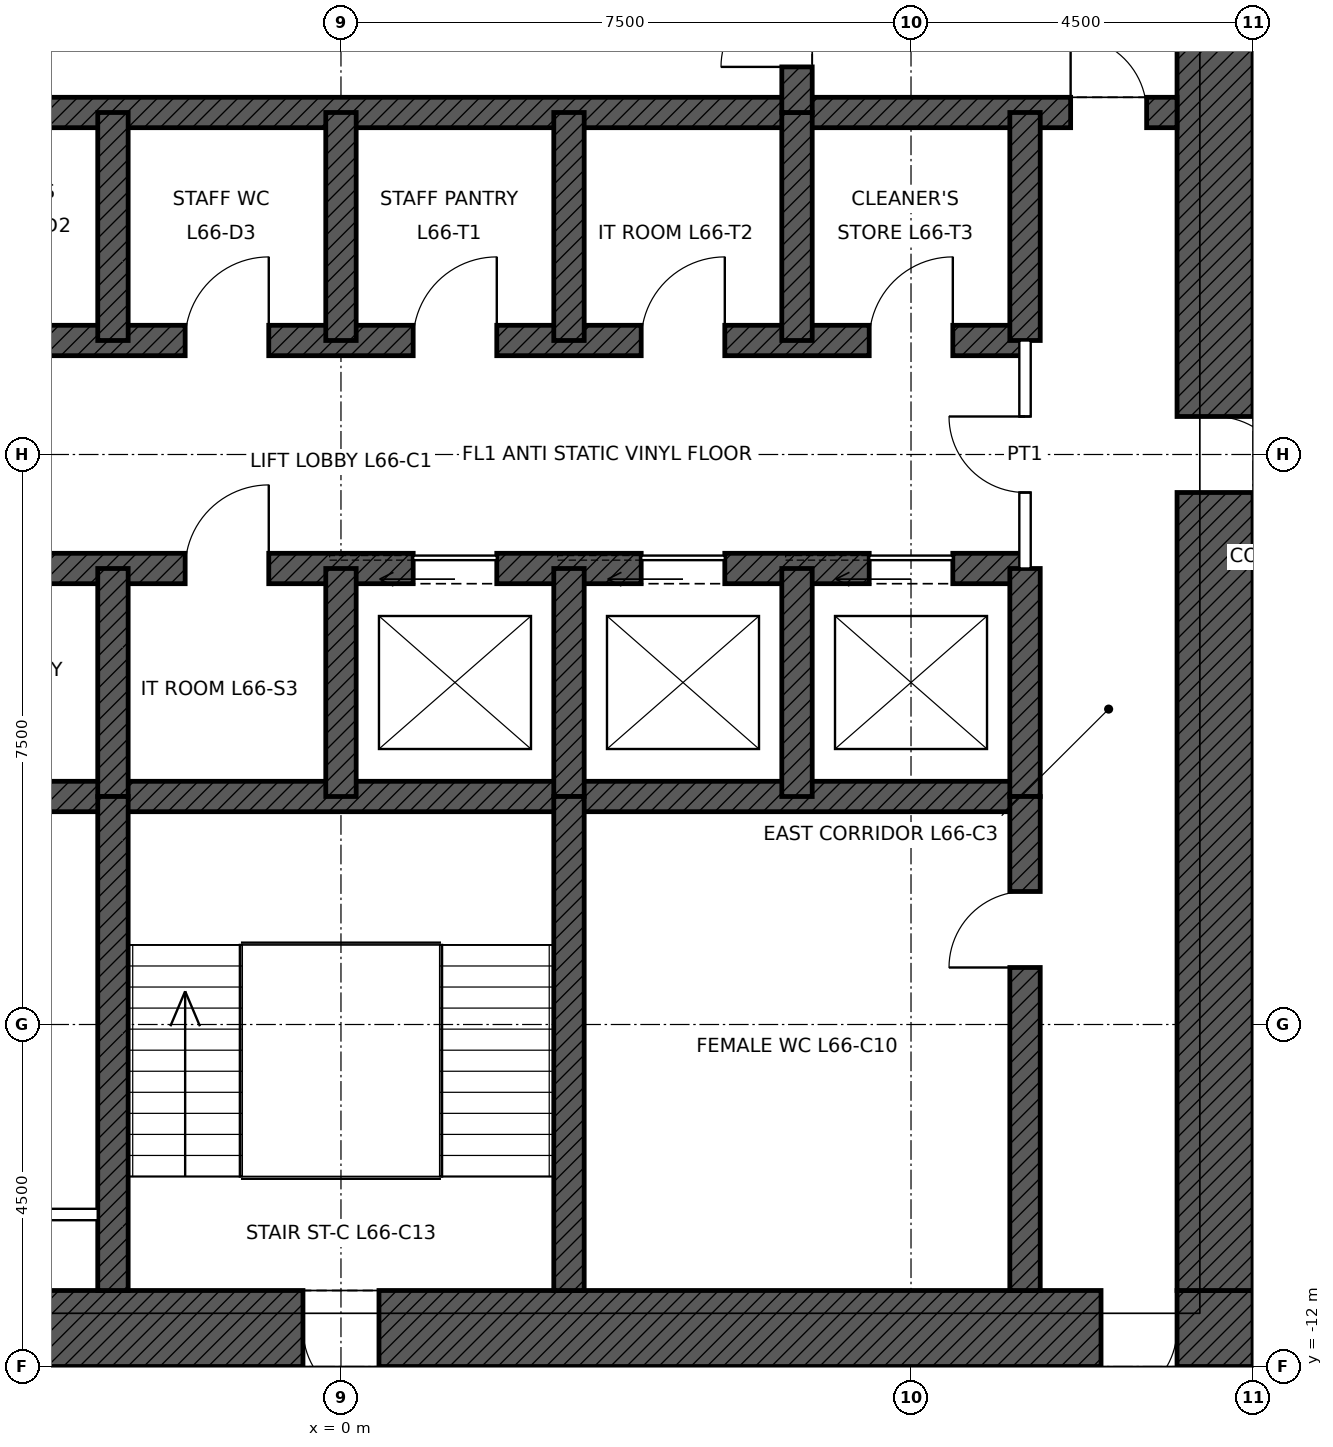
"""IFC4 building model, lengths in metres.
Left out: names, types, materials, properties, quantities, classifications, styles, units other than length and angle.
Written with IfcOpenShell. Run it as: python <this file> out.ifc"""

import sys

from ifc_helpers import new_model, si_unit, direction, frame, frame_2d, origin, place, context, subcontext, project, spatial, rectangle, extrude, element, fill, save


model = new_model("IFC4")
c1 = context("Model", 3, precision=1e-05, world=origin(), true_north=direction((0.0, 1.0)))
c2 = subcontext(c1, "Body", "Model", "MODEL_VIEW")
j1 = project(units=[si_unit("LENGTHUNIT", "METRE"), si_unit("PLANEANGLEUNIT", "RADIAN")], contexts=[c1])
p1 = place(None, origin())
s1 = spatial("IfcSite", under=j1, at=p1, CompositionType="ELEMENT")
p2 = place(p1, origin())
s2 = spatial("IfcBuilding", under=s1, at=p2, CompositionType="ELEMENT")
p3 = place(p2, frame((0.0, 0.0, 299.9)))
s3 = spatial("IfcBuildingStorey", under=s2, at=p3, CompositionType="ELEMENT", Elevation=299.9)
p4 = place(p3, frame((12.0, -11.5, 0.0), z_axis=(0.0, 0.0, 1.0), x_axis=(-1.0, 0.0, 0.0)))
e1 = element("IfcWall", 1, at=p4, inside=s3, PredefinedType="SHEAR", context=c2, shape_type="SweptSolid", body=[
    extrude(rectangle(XDim=24.0, YDim=1.0, at=frame_2d((12.0, 0.0))), origin(), (0.0, 0.0, 1.0), 4.0),
])
p5 = place(p4, frame((11.5, 0.0, 0.0)))
e2 = element("IfcOpeningElement", 2, at=p5, cuts=e1, PredefinedType="OPENING", context=c2, shape_type="SweptSolid", body=[
    extrude(rectangle(XDim=1.0, YDim=2.1, at=frame_2d((0.5, 1.05))), frame((0.0, 0.51, 0.0), z_axis=(0.0, -1.0, 0.0), x_axis=(1.0, 0.0, 0.0)), (0.0, 0.0, 1.0), 1.02),
])
p6 = place(p4, frame((1.0, 0.0, 0.0)))
e3 = element("IfcOpeningElement", 3, at=p6, cuts=e1, PredefinedType="OPENING", context=c2, shape_type="SweptSolid", body=[
    extrude(rectangle(XDim=1.0, YDim=2.4, at=frame_2d((0.5, 1.2))), frame((0.0, 0.51, 0.0), z_axis=(0.0, -1.0, 0.0), x_axis=(1.0, 0.0, 0.0)), (0.0, 0.0, 1.0), 1.02),
])
p7 = place(p3, frame((11.5, 11.0, 0.0), z_axis=(0.0, 0.0, 1.0), x_axis=(0.0, -1.0, 0.0)))
e4 = element("IfcWall", 4, at=p7, inside=s3, PredefinedType="SHEAR", context=c2, shape_type="SweptSolid", body=[
    extrude(rectangle(XDim=22.0, YDim=1.0, at=frame_2d((11.0, 0.0))), origin(), (0.0, 0.0, 1.0), 4.0),
])
p8 = place(p7, frame((10.5, 0.0, 0.0)))
e5 = element("IfcOpeningElement", 5, at=p8, cuts=e4, PredefinedType="OPENING", context=c2, shape_type="SweptSolid", body=[
    extrude(rectangle(XDim=1.0, YDim=2.4, at=frame_2d((0.5, 1.2))), frame((0.0, 0.51, 0.0), z_axis=(0.0, -1.0, 0.0), x_axis=(1.0, 0.0, 0.0)), (0.0, 0.0, 1.0), 1.02),
])
p9 = place(p3, frame((-11.0, 4.5, 0.0), z_axis=(0.0, 0.0, 1.0), x_axis=(1.0, 0.0, 0.0)))
e6 = element("IfcWall", 6, at=p9, inside=s3, PredefinedType="SHEAR", context=c2, shape_type="SweptSolid", body=[
    extrude(rectangle(XDim=22.0, YDim=0.4, at=frame_2d((11.0, 0.0))), origin(), (0.0, 0.0, 1.0), 4.0),
])
p10 = place(p9, frame((0.4, 0.0, 0.0)))
e7 = element("IfcOpeningElement", 7, at=p10, cuts=e6, PredefinedType="OPENING", context=c2, shape_type="SweptSolid", body=[
    extrude(rectangle(XDim=1.0, YDim=2.1, at=frame_2d((0.5, 1.05))), frame((0.0, 0.21, 0.0), z_axis=(0.0, -1.0, 0.0), x_axis=(1.0, 0.0, 0.0)), (0.0, 0.0, 1.0), 0.42),
])
p11 = place(p9, frame((20.6, 0.0, 0.0)))
e8 = element("IfcOpeningElement", 8, at=p11, cuts=e6, PredefinedType="OPENING", context=c2, shape_type="SweptSolid", body=[
    extrude(rectangle(XDim=1.0, YDim=2.1, at=frame_2d((0.5, 1.05))), frame((0.0, 0.21, 0.0), z_axis=(0.0, -1.0, 0.0), x_axis=(1.0, 0.0, 0.0)), (0.0, 0.0, 1.0), 0.42),
])
p12 = place(p3, frame((-9.0, 1.5, 0.0), z_axis=(0.0, 0.0, 1.0), x_axis=(1.0, 0.0, 0.0)))
e9 = element("IfcWall", 9, at=p12, inside=s3, PredefinedType="SHEAR", context=c2, shape_type="SweptSolid", body=[
    extrude(rectangle(XDim=18.0, YDim=0.4, at=frame_2d((9.0, 0.0))), origin(), (0.0, 0.0, 1.0), 4.0),
])
p13 = place(p12, frame((0.95, 0.0, 0.0)))
e10 = element("IfcOpeningElement", 10, at=p13, cuts=e9, PredefinedType="OPENING", context=c2, shape_type="SweptSolid", body=[
    extrude(rectangle(XDim=1.1, YDim=2.1, at=frame_2d((0.55, 1.05))), frame((0.0, 0.21, 0.0), z_axis=(0.0, -1.0, 0.0), x_axis=(1.0, 0.0, 0.0)), (0.0, 0.0, 1.0), 0.42),
])
p14 = place(p12, frame((3.95, 0.0, 0.0)))
e11 = element("IfcOpeningElement", 11, at=p14, cuts=e9, PredefinedType="OPENING", context=c2, shape_type="SweptSolid", body=[
    extrude(rectangle(XDim=1.1, YDim=2.1, at=frame_2d((0.55, 1.05))), frame((0.0, 0.21, 0.0), z_axis=(0.0, -1.0, 0.0), x_axis=(1.0, 0.0, 0.0)), (0.0, 0.0, 1.0), 0.42),
])
p15 = place(p12, frame((6.95, 0.0, 0.0)))
e12 = element("IfcOpeningElement", 12, at=p15, cuts=e9, PredefinedType="OPENING", context=c2, shape_type="SweptSolid", body=[
    extrude(rectangle(XDim=1.1, YDim=2.1, at=frame_2d((0.55, 1.05))), frame((0.0, 0.21, 0.0), z_axis=(0.0, -1.0, 0.0), x_axis=(1.0, 0.0, 0.0)), (0.0, 0.0, 1.0), 0.42),
])
p16 = place(p12, frame((9.95, 0.0, 0.0)))
e13 = element("IfcOpeningElement", 13, at=p16, cuts=e9, PredefinedType="OPENING", context=c2, shape_type="SweptSolid", body=[
    extrude(rectangle(XDim=1.1, YDim=2.1, at=frame_2d((0.55, 1.05))), frame((0.0, 0.21, 0.0), z_axis=(0.0, -1.0, 0.0), x_axis=(1.0, 0.0, 0.0)), (0.0, 0.0, 1.0), 0.42),
])
p17 = place(p12, frame((12.95, 0.0, 0.0)))
e14 = element("IfcOpeningElement", 14, at=p17, cuts=e9, PredefinedType="OPENING", context=c2, shape_type="SweptSolid", body=[
    extrude(rectangle(XDim=1.1, YDim=2.1, at=frame_2d((0.55, 1.05))), frame((0.0, 0.21, 0.0), z_axis=(0.0, -1.0, 0.0), x_axis=(1.0, 0.0, 0.0)), (0.0, 0.0, 1.0), 0.42),
])
p18 = place(p12, frame((15.95, 0.0, 0.0)))
e15 = element("IfcOpeningElement", 15, at=p18, cuts=e9, PredefinedType="OPENING", context=c2, shape_type="SweptSolid", body=[
    extrude(rectangle(XDim=1.1, YDim=2.1, at=frame_2d((0.55, 1.05))), frame((0.0, 0.21, 0.0), z_axis=(0.0, -1.0, 0.0), x_axis=(1.0, 0.0, 0.0)), (0.0, 0.0, 1.0), 0.42),
])
p19 = place(p3, frame((-9.0, -1.5, 0.0), z_axis=(0.0, 0.0, 1.0), x_axis=(1.0, 0.0, 0.0)))
e16 = element("IfcWall", 16, at=p19, inside=s3, PredefinedType="SHEAR", context=c2, shape_type="SweptSolid", body=[
    extrude(rectangle(XDim=18.0, YDim=0.4, at=frame_2d((9.0, 0.0))), origin(), (0.0, 0.0, 1.0), 4.0),
])
p20 = place(p19, frame((9.95, 0.0, 0.0)))
e17 = element("IfcOpeningElement", 17, at=p20, cuts=e16, PredefinedType="OPENING", context=c2, shape_type="SweptSolid", body=[
    extrude(rectangle(XDim=1.1, YDim=2.1, at=frame_2d((0.55, 1.05))), frame((0.0, 0.21, 0.0), z_axis=(0.0, -1.0, 0.0), x_axis=(1.0, 0.0, 0.0)), (0.0, 0.0, 1.0), 0.42),
])
p21 = place(p19, frame((12.95, 0.0, 0.0)))
e18 = element("IfcOpeningElement", 18, at=p21, cuts=e16, PredefinedType="OPENING", context=c2, shape_type="SweptSolid", body=[
    extrude(rectangle(XDim=1.1, YDim=2.1, at=frame_2d((0.55, 1.05))), frame((0.0, 0.21, 0.0), z_axis=(0.0, -1.0, 0.0), x_axis=(1.0, 0.0, 0.0)), (0.0, 0.0, 1.0), 0.42),
])
p22 = place(p19, frame((15.95, 0.0, 0.0)))
e19 = element("IfcOpeningElement", 19, at=p22, cuts=e16, PredefinedType="OPENING", context=c2, shape_type="SweptSolid", body=[
    extrude(rectangle(XDim=1.1, YDim=2.1, at=frame_2d((0.55, 1.05))), frame((0.0, 0.21, 0.0), z_axis=(0.0, -1.0, 0.0), x_axis=(1.0, 0.0, 0.0)), (0.0, 0.0, 1.0), 0.42),
])
p23 = place(p19, frame((0.95, 0.0, 0.0)))
e20 = element("IfcOpeningElement", 20, at=p23, cuts=e16, PredefinedType="OPENING", context=c2, shape_type="SweptSolid", body=[
    extrude(rectangle(XDim=1.1, YDim=2.1, at=frame_2d((0.55, 1.05))), frame((0.0, 0.21, 0.0), z_axis=(0.0, -1.0, 0.0), x_axis=(1.0, 0.0, 0.0)), (0.0, 0.0, 1.0), 0.42),
])
p24 = place(p19, frame((3.95, 0.0, 0.0)))
e21 = element("IfcOpeningElement", 21, at=p24, cuts=e16, PredefinedType="OPENING", context=c2, shape_type="SweptSolid", body=[
    extrude(rectangle(XDim=1.1, YDim=2.1, at=frame_2d((0.55, 1.05))), frame((0.0, 0.21, 0.0), z_axis=(0.0, -1.0, 0.0), x_axis=(1.0, 0.0, 0.0)), (0.0, 0.0, 1.0), 0.42),
])
p25 = place(p19, frame((6.95, 0.0, 0.0)))
e22 = element("IfcOpeningElement", 22, at=p25, cuts=e16, PredefinedType="OPENING", context=c2, shape_type="SweptSolid", body=[
    extrude(rectangle(XDim=1.1, YDim=2.1, at=frame_2d((0.55, 1.05))), frame((0.0, 0.21, 0.0), z_axis=(0.0, -1.0, 0.0), x_axis=(1.0, 0.0, 0.0)), (0.0, 0.0, 1.0), 0.42),
])
p26 = place(p3, frame((-9.0, -4.5, 0.0), z_axis=(0.0, 0.0, 1.0), x_axis=(1.0, 0.0, 0.0)))
e23 = element("IfcWall", 23, at=p26, inside=s3, PredefinedType="SHEAR", context=c2, shape_type="SweptSolid", body=[
    extrude(rectangle(XDim=18.0, YDim=0.4, at=frame_2d((9.0, 0.0))), origin(), (0.0, 0.0, 1.0), 4.0),
])
for number, where, z_axis, x_axis in (
    (24, (9.0, 1.5, 0.0), (0.0, 0.0, 1.0), (0.0, 1.0, 0.0)),
    (25, (9.0, -4.5, 0.0), (0.0, 0.0, 1.0), (0.0, 1.0, 0.0)),
    (26, (-3.0, 1.5, 0.0), (0.0, 0.0, 1.0), (0.0, 1.0, 0.0)),
    (27, (0.0, 1.5, 0.0), (0.0, 0.0, 1.0), (0.0, 1.0, 0.0)),
    (28, (3.0, 1.5, 0.0), (0.0, 0.0, 1.0), (0.0, 1.0, 0.0)),
    (29, (6.0, 1.5, 0.0), (0.0, 0.0, 1.0), (0.0, 1.0, 0.0)),
    (30, (-3.0, -4.5, 0.0), (0.0, 0.0, 1.0), (0.0, 1.0, 0.0)),
    (31, (0.0, -4.5, 0.0), (0.0, 0.0, 1.0), (0.0, 1.0, 0.0)),
    (32, (3.0, -4.5, 0.0), (0.0, 0.0, 1.0), (0.0, 1.0, 0.0)),
    (33, (6.0, -4.5, 0.0), (0.0, 0.0, 1.0), (0.0, 1.0, 0.0)),
):
    element("IfcWall", number, at=place(p3, frame(where, z_axis=z_axis, x_axis=x_axis)), inside=s3, PredefinedType="SHEAR", context=c2, shape_type="SweptSolid", body=[
        extrude(rectangle(XDim=3.0, YDim=0.4, at=frame_2d((1.5, 0.0))), origin(), (0.0, 0.0, 1.0), 4.0),
    ])
p27 = place(p3, frame((6.0, 4.5, 0.0), z_axis=(0.0, 0.0, 1.0), x_axis=(0.0, 1.0, 0.0)))
e34 = element("IfcWall", 34, at=p27, inside=s3, PredefinedType="SHEAR", context=c2, shape_type="SweptSolid", body=[
    extrude(rectangle(XDim=6.5, YDim=0.4, at=frame_2d((3.25, 0.0))), origin(), (0.0, 0.0, 1.0), 4.0),
])
p28 = place(p27, frame((0.6, 0.0, 0.0)))
e35 = element("IfcOpeningElement", 35, at=p28, cuts=e34, PredefinedType="OPENING", context=c2, shape_type="SweptSolid", body=[
    extrude(rectangle(XDim=1.0, YDim=2.1, at=frame_2d((0.5, 1.05))), frame((0.0, 0.21, 0.0), z_axis=(0.0, -1.0, 0.0), x_axis=(1.0, 0.0, 0.0)), (0.0, 0.0, 1.0), 0.42),
])
p29 = place(p3, frame((9.0, -11.0, 0.0), z_axis=(0.0, 0.0, 1.0), x_axis=(0.0, 1.0, 0.0)))
e36 = element("IfcWall", 36, at=p29, inside=s3, PredefinedType="SHEAR", context=c2, shape_type="SweptSolid", body=[
    extrude(rectangle(XDim=6.5, YDim=0.4, at=frame_2d((3.25, 0.0))), origin(), (0.0, 0.0, 1.0), 4.0),
])
p30 = place(p29, frame((4.25, 0.0, 0.0)))
e37 = element("IfcOpeningElement", 37, at=p30, cuts=e36, PredefinedType="OPENING", context=c2, shape_type="SweptSolid", body=[
    extrude(rectangle(XDim=1.0, YDim=2.1, at=frame_2d((0.5, 1.05))), frame((0.0, 0.21, 0.0), z_axis=(0.0, -1.0, 0.0), x_axis=(1.0, 0.0, 0.0)), (0.0, 0.0, 1.0), 0.42),
])
for number, where, z_axis, x_axis in (
    (38, (-3.0, -11.0, 0.0), (0.0, 0.0, 1.0), (0.0, 1.0, 0.0)),
    (39, (3.0, -11.0, 0.0), (0.0, 0.0, 1.0), (0.0, 1.0, 0.0)),
):
    element("IfcWall", number, at=place(p3, frame(where, z_axis=z_axis, x_axis=x_axis)), inside=s3, PredefinedType="SHEAR", context=c2, shape_type="SweptSolid", body=[
        extrude(rectangle(XDim=6.5, YDim=0.4, at=frame_2d((3.25, 0.0))), origin(), (0.0, 0.0, 1.0), 4.0),
    ])
p31 = place(p3, frame((-8.8, -10.0, 0.0), z_axis=(0.0, 0.0, 1.0), x_axis=(1.0, 0.0, 0.0)))
e40 = element("IfcWall", 40, at=p31, inside=s3, PredefinedType="PARTITIONING", context=c2, shape_type="SweptSolid", body=[
    extrude(rectangle(XDim=5.6, YDim=0.15, at=frame_2d((2.8, 0.0))), origin(), (0.0, 0.0, 1.0), 3.75),
])
p32 = place(p31, frame((2.3, 0.0, 0.0)))
e41 = element("IfcOpeningElement", 41, at=p32, cuts=e40, PredefinedType="OPENING", context=c2, shape_type="SweptSolid", body=[
    extrude(rectangle(XDim=1.0, YDim=2.1, at=frame_2d((0.5, 1.05))), frame((0.0, 0.085, 0.0), z_axis=(0.0, -1.0, 0.0), x_axis=(1.0, 0.0, 0.0)), (0.0, 0.0, 1.0), 0.17),
])
p33 = place(p3, frame((9.0, -1.5, 0.0), z_axis=(0.0, 0.0, 1.0), x_axis=(0.0, 1.0, 0.0)))
e42 = element("IfcWall", 42, at=p33, inside=s3, PredefinedType="PARTITIONING", context=c2, shape_type="SweptSolid", body=[
    extrude(rectangle(XDim=3.0, YDim=0.15, at=frame_2d((1.5, 0.0))), origin(), (0.0, 0.0, 1.0), 3.75),
])
p34 = place(p33, frame((1.0, 0.0, 0.0)))
e43 = element("IfcOpeningElement", 43, at=p34, cuts=e42, PredefinedType="OPENING", context=c2, shape_type="SweptSolid", body=[
    extrude(rectangle(XDim=1.0, YDim=2.4, at=frame_2d((0.5, 1.2))), frame((0.0, 0.085, 0.0), z_axis=(0.0, -1.0, 0.0), x_axis=(1.0, 0.0, 0.0)), (0.0, 0.0, 1.0), 0.17),
])
p35 = place(p11, origin())
e44 = element("IfcDoor", 44, at=p35, inside=s3, OperationType="SINGLE_SWING_LEFT", PredefinedType="DOOR", context=c2, shape_type="SweptSolid", body=[
    extrude(rectangle(XDim=1.0, YDim=2.1, at=frame_2d((0.5, 1.05))), frame((0.0, 0.025, 0.0), z_axis=(0.0, -1.0, 0.0), x_axis=(1.0, 0.0, 0.0)), (0.0, 0.0, 1.0), 0.05),
])
fill(e8, e44)
p36 = place(p28, origin())
e45 = element("IfcDoor", 45, at=p36, inside=s3, OperationType="SINGLE_SWING_LEFT", PredefinedType="DOOR", context=c2, shape_type="SweptSolid", body=[
    extrude(rectangle(XDim=1.0, YDim=2.1, at=frame_2d((0.5, 1.05))), frame((0.0, 0.025, 0.0), z_axis=(0.0, -1.0, 0.0), x_axis=(1.0, 0.0, 0.0)), (0.0, 0.0, 1.0), 0.05),
])
fill(e35, e45)
p37 = place(p5, origin())
e46 = element("IfcDoor", 46, at=p37, inside=s3, OperationType="SINGLE_SWING_LEFT", PredefinedType="DOOR", context=c2, shape_type="SweptSolid", body=[
    extrude(rectangle(XDim=1.0, YDim=2.1, at=frame_2d((0.5, 1.05))), frame((0.0, 0.485, 0.0), z_axis=(0.0, -1.0, 0.0), x_axis=(1.0, 0.0, 0.0)), (0.0, 0.0, 1.0), 0.05),
])
fill(e2, e46)
p38 = place(p8, origin())
e47 = element("IfcDoor", 47, at=p38, inside=s3, OperationType="SINGLE_SWING_RIGHT", PredefinedType="DOOR", context=c2, shape_type="SweptSolid", body=[
    extrude(rectangle(XDim=1.0, YDim=2.4, at=frame_2d((0.5, 1.2))), frame((0.0, 0.485, 0.0), z_axis=(0.0, -1.0, 0.0), x_axis=(1.0, 0.0, 0.0)), (0.0, 0.0, 1.0), 0.05),
])
fill(e5, e47)
p39 = place(p6, origin())
e48 = element("IfcDoor", 48, at=p39, inside=s3, OperationType="SINGLE_SWING_RIGHT", PredefinedType="DOOR", context=c2, shape_type="SweptSolid", body=[
    extrude(rectangle(XDim=1.0, YDim=2.4, at=frame_2d((0.5, 1.2))), frame((0.0, 0.485, 0.0), z_axis=(0.0, -1.0, 0.0), x_axis=(1.0, 0.0, 0.0)), (0.0, 0.0, 1.0), 0.05),
])
fill(e3, e48)
p40 = place(p30, origin())
e49 = element("IfcDoor", 49, at=p40, inside=s3, OperationType="SINGLE_SWING_LEFT", PredefinedType="DOOR", context=c2, shape_type="SweptSolid", body=[
    extrude(rectangle(XDim=1.0, YDim=2.1, at=frame_2d((0.5, 1.05))), frame((0.0, 0.025, 0.0), z_axis=(0.0, -1.0, 0.0), x_axis=(1.0, 0.0, 0.0)), (0.0, 0.0, 1.0), 0.05),
])
fill(e37, e49)
p41 = place(p20, origin())
e50 = element("IfcDoor", 50, at=p41, inside=s3, OperationType="SLIDING_TO_LEFT", PredefinedType="DOOR", context=c2, shape_type="SweptSolid", body=[
    extrude(rectangle(XDim=1.1, YDim=2.1, at=frame_2d((0.55, 1.05))), frame((0.0, 0.025, 0.0), z_axis=(0.0, -1.0, 0.0), x_axis=(1.0, 0.0, 0.0)), (0.0, 0.0, 1.0), 0.05),
])
fill(e17, e50)
p42 = place(p21, origin())
e51 = element("IfcDoor", 51, at=p42, inside=s3, OperationType="SLIDING_TO_LEFT", PredefinedType="DOOR", context=c2, shape_type="SweptSolid", body=[
    extrude(rectangle(XDim=1.1, YDim=2.1, at=frame_2d((0.55, 1.05))), frame((0.0, 0.025, 0.0), z_axis=(0.0, -1.0, 0.0), x_axis=(1.0, 0.0, 0.0)), (0.0, 0.0, 1.0), 0.05),
])
fill(e18, e51)
p43 = place(p22, origin())
e52 = element("IfcDoor", 52, at=p43, inside=s3, OperationType="SLIDING_TO_LEFT", PredefinedType="DOOR", context=c2, shape_type="SweptSolid", body=[
    extrude(rectangle(XDim=1.1, YDim=2.1, at=frame_2d((0.55, 1.05))), frame((0.0, 0.025, 0.0), z_axis=(0.0, -1.0, 0.0), x_axis=(1.0, 0.0, 0.0)), (0.0, 0.0, 1.0), 0.05),
])
fill(e19, e52)
p44 = place(p34, origin())
e53 = element("IfcDoor", 53, at=p44, inside=s3, OperationType="SINGLE_SWING_RIGHT", PredefinedType="DOOR", context=c2, shape_type="SweptSolid", body=[
    extrude(rectangle(XDim=1.0, YDim=2.4, at=frame_2d((0.5, 1.2))), frame((0.0, 0.025, 0.0), z_axis=(0.0, -1.0, 0.0), x_axis=(1.0, 0.0, 0.0)), (0.0, 0.0, 1.0), 0.05),
])
fill(e43, e53)
p45 = place(p15, origin())
e54 = element("IfcDoor", 54, at=p45, inside=s3, OperationType="SINGLE_SWING_RIGHT", PredefinedType="DOOR", context=c2, shape_type="SweptSolid", body=[
    extrude(rectangle(XDim=1.1, YDim=2.1, at=frame_2d((0.55, 1.05))), frame((0.0, 0.025, 0.0), z_axis=(0.0, -1.0, 0.0), x_axis=(1.0, 0.0, 0.0)), (0.0, 0.0, 1.0), 0.05),
])
fill(e12, e54)
p46 = place(p16, origin())
e55 = element("IfcDoor", 55, at=p46, inside=s3, OperationType="SINGLE_SWING_RIGHT", PredefinedType="DOOR", context=c2, shape_type="SweptSolid", body=[
    extrude(rectangle(XDim=1.1, YDim=2.1, at=frame_2d((0.55, 1.05))), frame((0.0, 0.025, 0.0), z_axis=(0.0, -1.0, 0.0), x_axis=(1.0, 0.0, 0.0)), (0.0, 0.0, 1.0), 0.05),
])
fill(e13, e55)
p47 = place(p17, origin())
e56 = element("IfcDoor", 56, at=p47, inside=s3, OperationType="SINGLE_SWING_RIGHT", PredefinedType="DOOR", context=c2, shape_type="SweptSolid", body=[
    extrude(rectangle(XDim=1.1, YDim=2.1, at=frame_2d((0.55, 1.05))), frame((0.0, 0.025, 0.0), z_axis=(0.0, -1.0, 0.0), x_axis=(1.0, 0.0, 0.0)), (0.0, 0.0, 1.0), 0.05),
])
fill(e14, e56)
p48 = place(p18, origin())
e57 = element("IfcDoor", 57, at=p48, inside=s3, OperationType="SINGLE_SWING_RIGHT", PredefinedType="DOOR", context=c2, shape_type="SweptSolid", body=[
    extrude(rectangle(XDim=1.1, YDim=2.1, at=frame_2d((0.55, 1.05))), frame((0.0, 0.025, 0.0), z_axis=(0.0, -1.0, 0.0), x_axis=(1.0, 0.0, 0.0)), (0.0, 0.0, 1.0), 0.05),
])
fill(e15, e57)
p49 = place(p25, origin())
e58 = element("IfcDoor", 58, at=p49, inside=s3, OperationType="SINGLE_SWING_RIGHT", PredefinedType="DOOR", context=c2, shape_type="SweptSolid", body=[
    extrude(rectangle(XDim=1.1, YDim=2.1, at=frame_2d((0.55, 1.05))), frame((0.0, 0.025, 0.0), z_axis=(0.0, -1.0, 0.0), x_axis=(1.0, 0.0, 0.0)), (0.0, 0.0, 1.0), 0.05),
])
fill(e22, e58)
save(model, sys.argv[1])
